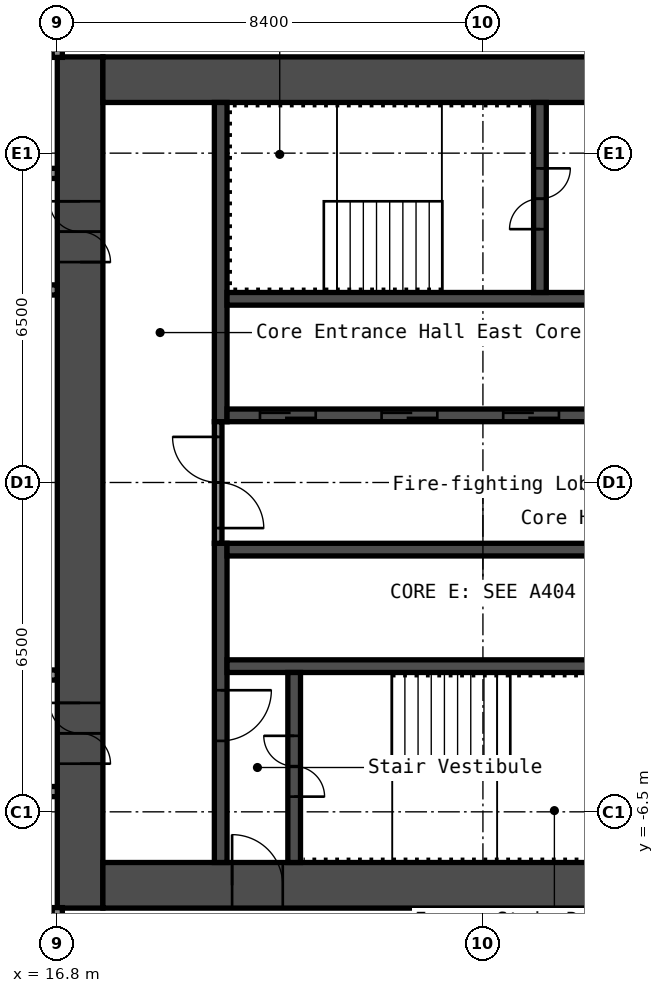
"""IFC4 building model, lengths in metres.
Left out: names, types, materials, properties, quantities, classifications, styles, units other than length and angle.
Written with IfcOpenShell. Run it as: python <this file> out.ifc"""

import sys

from ifc_helpers import new_model, si_unit, direction, frame, frame_2d, origin, place, context, subcontext, project, spatial, rectangle, extrude, element, fill, save


model = new_model("IFC4")
c1 = context("Model", 3, precision=1e-05, world=origin(), true_north=direction((0.0, 1.0)))
c2 = subcontext(c1, "Body", "Model", "MODEL_VIEW")
j1 = project(units=[si_unit("LENGTHUNIT", "METRE"), si_unit("PLANEANGLEUNIT", "RADIAN")], contexts=[c1])
p1 = place(None, origin())
s1 = spatial("IfcSite", under=j1, at=p1, CompositionType="ELEMENT")
p2 = place(p1, origin())
s2 = spatial("IfcBuilding", under=s1, at=p2, CompositionType="ELEMENT")
p3 = place(p2, frame((0.0, 0.0, 26.2)))
s3 = spatial("IfcBuildingStorey", under=s2, at=p3, CompositionType="ELEMENT", Elevation=26.2)
p4 = place(p3, frame((17.25, -8.4, 0.0), z_axis=(0.0, 0.0, 1.0), x_axis=(0.0, 1.0, 0.0)))
e1 = element("IfcWall", 1, at=p4, inside=s3, PredefinedType="SHEAR", context=c2, shape_type="SweptSolid", body=[
    extrude(rectangle(XDim=16.8, YDim=0.9, at=frame_2d((8.4, 0.0))), origin(), (0.0, 0.0, 1.0), 2.8),
])
p5 = place(p4, frame((12.75, 0.0, 0.0)))
e2 = element("IfcOpeningElement", 2, at=p5, cuts=e1, PredefinedType="OPENING", context=c2, shape_type="SweptSolid", body=[
    extrude(rectangle(XDim=1.2, YDim=2.1, at=frame_2d((0.6, 1.05))), frame((0.0, 0.46, 0.0), z_axis=(0.0, -1.0, 0.0), x_axis=(1.0, 0.0, 0.0)), (0.0, 0.0, 1.0), 0.92),
])
p6 = place(p4, frame((2.85, 0.0, 0.0)))
e3 = element("IfcOpeningElement", 3, at=p6, cuts=e1, PredefinedType="OPENING", context=c2, shape_type="SweptSolid", body=[
    extrude(rectangle(XDim=1.2, YDim=2.1, at=frame_2d((0.6, 1.05))), frame((0.0, 0.46, 0.0), z_axis=(0.0, -1.0, 0.0), x_axis=(1.0, 0.0, 0.0)), (0.0, 0.0, 1.0), 0.92),
])
p7 = place(p3, frame((17.7, 7.95, 0.0), z_axis=(0.0, 0.0, 1.0), x_axis=(1.0, 0.0, 0.0)))
e4 = element("IfcWall", 4, at=p7, inside=s3, PredefinedType="SHEAR", context=c2, shape_type="SweptSolid", body=[
    extrude(rectangle(XDim=15.0, YDim=0.9, at=frame_2d((7.5, 0.0))), origin(), (0.0, 0.0, 1.0), 2.8),
])
p8 = place(p7, frame((10.4, 0.0, 0.0)))
e5 = element("IfcOpeningElement", 5, at=p8, cuts=e4, PredefinedType="OPENING", context=c2, shape_type="SweptSolid", body=[
    extrude(rectangle(XDim=1.2, YDim=2.1, at=frame_2d((0.6, 1.05))), frame((0.0, 0.46, 0.0), z_axis=(0.0, -1.0, 0.0), x_axis=(1.0, 0.0, 0.0)), (0.0, 0.0, 1.0), 0.92),
])
p9 = place(p7, frame((13.35, 0.0, 0.0)))
e6 = element("IfcOpeningElement", 6, at=p9, cuts=e4, PredefinedType="OPENING", context=c2, shape_type="SweptSolid", body=[
    extrude(rectangle(XDim=0.9, YDim=2.1, at=frame_2d((0.45, 1.05))), frame((0.0, 0.46, 0.0), z_axis=(0.0, -1.0, 0.0), x_axis=(1.0, 0.0, 0.0)), (0.0, 0.0, 1.0), 0.92),
])
p10 = place(p3, frame((17.7, -7.95, 0.0), z_axis=(0.0, 0.0, 1.0), x_axis=(1.0, 0.0, 0.0)))
e7 = element("IfcWall", 7, at=p10, inside=s3, PredefinedType="SHEAR", context=c2, shape_type="SweptSolid", body=[
    extrude(rectangle(XDim=15.0, YDim=0.9, at=frame_2d((7.5, 0.0))), origin(), (0.0, 0.0, 1.0), 2.8),
])
p11 = place(p10, frame((2.55, 0.0, 0.0)))
e8 = element("IfcOpeningElement", 8, at=p11, cuts=e7, PredefinedType="OPENING", context=c2, shape_type="SweptSolid", body=[
    extrude(rectangle(XDim=1.0, YDim=2.1, at=frame_2d((0.5, 1.05))), frame((0.0, 0.46, 0.0), z_axis=(0.0, -1.0, 0.0), x_axis=(1.0, 0.0, 0.0)), (0.0, 0.0, 1.0), 0.92),
])
p12 = place(p3, frame((20.025, 1.2, 0.0), z_axis=(0.0, 0.0, 1.0), x_axis=(0.0, 1.0, 0.0)))
e9 = element("IfcWall", 9, at=p12, inside=s3, PredefinedType="SHEAR", context=c2, shape_type="SweptSolid", body=[
    extrude(rectangle(XDim=6.3, YDim=0.25, at=frame_2d((3.15, 0.0))), origin(), (0.0, 0.0, 1.0), 2.8),
])
p13 = place(p3, frame((20.025, -7.5, 0.0), z_axis=(0.0, 0.0, 1.0), x_axis=(0.0, 1.0, 0.0)))
e10 = element("IfcWall", 10, at=p13, inside=s3, PredefinedType="SHEAR", context=c2, shape_type="SweptSolid", body=[
    extrude(rectangle(XDim=6.3, YDim=0.25, at=frame_2d((3.15, 0.0))), origin(), (0.0, 0.0, 1.0), 2.8),
])
p14 = place(p13, frame((2.4, 0.0, 0.0)))
e11 = element("IfcOpeningElement", 11, at=p14, cuts=e10, PredefinedType="OPENING", context=c2, shape_type="SweptSolid", body=[
    extrude(rectangle(XDim=1.0, YDim=2.1, at=frame_2d((0.5, 1.05))), frame((0.0, 0.135, 0.0), z_axis=(0.0, -1.0, 0.0), x_axis=(1.0, 0.0, 0.0)), (0.0, 0.0, 1.0), 0.27),
])
p15 = place(p3, frame((20.15, 1.325, 0.0), z_axis=(0.0, 0.0, 1.0), x_axis=(1.0, 0.0, 0.0)))
e12 = element("IfcWall", 12, at=p15, inside=s3, PredefinedType="SHEAR", context=c2, shape_type="SweptSolid", body=[
    extrude(rectangle(XDim=7.5, YDim=0.25, at=frame_2d((3.75, 0.0))), origin(), (0.0, 0.0, 1.0), 2.8),
])
p16 = place(p15, frame((0.65, 0.0, 0.0)))
e13 = element("IfcOpeningElement", 13, at=p16, cuts=e12, PredefinedType="OPENING", context=c2, shape_type="SweptSolid", body=[
    extrude(rectangle(XDim=1.1, YDim=2.1, at=frame_2d((0.55, 1.05))), frame((0.0, 0.135, 0.0), z_axis=(0.0, -1.0, 0.0), x_axis=(1.0, 0.0, 0.0)), (0.0, 0.0, 1.0), 0.27),
])
p17 = place(p15, frame((3.05, 0.0, 0.0)))
e14 = element("IfcOpeningElement", 14, at=p17, cuts=e12, PredefinedType="OPENING", context=c2, shape_type="SweptSolid", body=[
    extrude(rectangle(XDim=1.1, YDim=2.1, at=frame_2d((0.55, 1.05))), frame((0.0, 0.135, 0.0), z_axis=(0.0, -1.0, 0.0), x_axis=(1.0, 0.0, 0.0)), (0.0, 0.0, 1.0), 0.27),
])
p18 = place(p15, frame((5.45, 0.0, 0.0)))
e15 = element("IfcOpeningElement", 15, at=p18, cuts=e12, PredefinedType="OPENING", context=c2, shape_type="SweptSolid", body=[
    extrude(rectangle(XDim=1.1, YDim=2.1, at=frame_2d((0.55, 1.05))), frame((0.0, 0.135, 0.0), z_axis=(0.0, -1.0, 0.0), x_axis=(1.0, 0.0, 0.0)), (0.0, 0.0, 1.0), 0.27),
])
p19 = place(p3, frame((20.15, 3.625, 0.0), z_axis=(0.0, 0.0, 1.0), x_axis=(1.0, 0.0, 0.0)))
e16 = element("IfcWall", 16, at=p19, inside=s3, PredefinedType="SHEAR", context=c2, shape_type="SweptSolid", body=[
    extrude(rectangle(XDim=7.5, YDim=0.25, at=frame_2d((3.75, 0.0))), origin(), (0.0, 0.0, 1.0), 2.8),
])
p20 = place(p3, frame((26.325, 3.75, 0.0), z_axis=(0.0, 0.0, 1.0), x_axis=(0.0, 1.0, 0.0)))
e17 = element("IfcWall", 17, at=p20, inside=s3, PredefinedType="SHEAR", context=c2, shape_type="SweptSolid", body=[
    extrude(rectangle(XDim=3.75, YDim=0.25, at=frame_2d((1.875, 0.0))), origin(), (0.0, 0.0, 1.0), 2.8),
])
p21 = place(p20, frame((1.25, 0.0, 0.0)))
e18 = element("IfcOpeningElement", 18, at=p21, cuts=e17, PredefinedType="OPENING", context=c2, shape_type="SweptSolid", body=[
    extrude(rectangle(XDim=1.2, YDim=2.1, at=frame_2d((0.6, 1.05))), frame((0.0, 0.135, 0.0), z_axis=(0.0, -1.0, 0.0), x_axis=(1.0, 0.0, 0.0)), (0.0, 0.0, 1.0), 0.27),
])
for number, where, z_axis, x_axis in (
    (19, (20.15, -1.325, 0.0), (0.0, 0.0, 1.0), (1.0, 0.0, 0.0)),
    (20, (20.15, -3.625, 0.0), (0.0, 0.0, 1.0), (1.0, 0.0, 0.0)),
):
    element("IfcWall", number, at=place(p3, frame(where, z_axis=z_axis, x_axis=x_axis)), inside=s3, PredefinedType="SHEAR", context=c2, shape_type="SweptSolid", body=[
        extrude(rectangle(XDim=7.5, YDim=0.25, at=frame_2d((3.75, 0.0))), origin(), (0.0, 0.0, 1.0), 2.8),
    ])
p22 = place(p3, frame((21.475, -7.5, 0.0), z_axis=(0.0, 0.0, 1.0), x_axis=(0.0, 1.0, 0.0)))
e21 = element("IfcWall", 21, at=p22, inside=s3, PredefinedType="SHEAR", context=c2, shape_type="SweptSolid", body=[
    extrude(rectangle(XDim=3.75, YDim=0.25, at=frame_2d((1.875, 0.0))), origin(), (0.0, 0.0, 1.0), 2.8),
])
p23 = place(p22, frame((1.3, 0.0, 0.0)))
e22 = element("IfcOpeningElement", 22, at=p23, cuts=e21, PredefinedType="OPENING", context=c2, shape_type="SweptSolid", body=[
    extrude(rectangle(XDim=1.2, YDim=2.1, at=frame_2d((0.6, 1.05))), frame((0.0, 0.135, 0.0), z_axis=(0.0, -1.0, 0.0), x_axis=(1.0, 0.0, 0.0)), (0.0, 0.0, 1.0), 0.27),
])
p24 = place(p3, frame((19.975, -1.2, 0.0), z_axis=(0.0, 0.0, 1.0), x_axis=(0.0, 1.0, 0.0)))
e23 = element("IfcWall", 23, at=p24, inside=s3, PredefinedType="PARTITIONING", context=c2, shape_type="SweptSolid", body=[
    extrude(rectangle(XDim=2.4, YDim=0.15, at=frame_2d((1.2, 0.0))), origin(), (0.0, 0.0, 1.0), 2.8),
])
p25 = place(p24, frame((0.3, 0.0, 0.0)))
e24 = element("IfcOpeningElement", 24, at=p25, cuts=e23, PredefinedType="OPENING", context=c2, shape_type="SweptSolid", body=[
    extrude(rectangle(XDim=1.8, YDim=2.1, at=frame_2d((0.9, 1.05))), frame((0.0, 0.085, 0.0), z_axis=(0.0, -1.0, 0.0), x_axis=(1.0, 0.0, 0.0)), (0.0, 0.0, 1.0), 0.17),
])
p26 = place(p3, frame((-16.8, -6.1, 0.0), z_axis=(0.0, 0.0, 1.0), x_axis=(1.0, 0.0, 0.0)))
e25 = element("IfcWall", 25, at=p26, inside=s3, PredefinedType="PARTITIONING", context=c2, shape_type="SweptSolid", body=[
    extrude(rectangle(XDim=33.6, YDim=0.2, at=frame_2d((16.8, 0.0))), origin(), (0.0, 0.0, 1.0), 2.8),
])
p27 = place(p26, frame((2.0, 0.0, 0.0)))
e26 = element("IfcOpeningElement", 26, at=p27, cuts=e25, PredefinedType="OPENING", context=c2, shape_type="SweptSolid", body=[
    extrude(rectangle(XDim=1.0, YDim=2.1, at=frame_2d((0.5, 1.05))), frame((0.0, 0.11, 0.0), z_axis=(0.0, -1.0, 0.0), x_axis=(1.0, 0.0, 0.0)), (0.0, 0.0, 1.0), 0.22),
])
p28 = place(p26, frame((11.25, 0.0, 0.0)))
e27 = element("IfcOpeningElement", 27, at=p28, cuts=e25, PredefinedType="OPENING", context=c2, shape_type="SweptSolid", body=[
    extrude(rectangle(XDim=1.0, YDim=2.1, at=frame_2d((0.5, 1.05))), frame((0.0, 0.11, 0.0), z_axis=(0.0, -1.0, 0.0), x_axis=(1.0, 0.0, 0.0)), (0.0, 0.0, 1.0), 0.22),
])
p29 = place(p26, frame((12.95, 0.0, 0.0)))
e28 = element("IfcOpeningElement", 28, at=p29, cuts=e25, PredefinedType="OPENING", context=c2, shape_type="SweptSolid", body=[
    extrude(rectangle(XDim=1.0, YDim=2.1, at=frame_2d((0.5, 1.05))), frame((0.0, 0.11, 0.0), z_axis=(0.0, -1.0, 0.0), x_axis=(1.0, 0.0, 0.0)), (0.0, 0.0, 1.0), 0.22),
])
p30 = place(p26, frame((18.28, 0.0, 0.0)))
e29 = element("IfcOpeningElement", 29, at=p30, cuts=e25, PredefinedType="OPENING", context=c2, shape_type="SweptSolid", body=[
    extrude(rectangle(XDim=0.9, YDim=2.1, at=frame_2d((0.45, 1.05))), frame((0.0, 0.11, 0.0), z_axis=(0.0, -1.0, 0.0), x_axis=(1.0, 0.0, 0.0)), (0.0, 0.0, 1.0), 0.22),
])
p31 = place(p26, frame((22.48, 0.0, 0.0)))
e30 = element("IfcOpeningElement", 30, at=p31, cuts=e25, PredefinedType="OPENING", context=c2, shape_type="SweptSolid", body=[
    extrude(rectangle(XDim=0.9, YDim=2.1, at=frame_2d((0.45, 1.05))), frame((0.0, 0.11, 0.0), z_axis=(0.0, -1.0, 0.0), x_axis=(1.0, 0.0, 0.0)), (0.0, 0.0, 1.0), 0.22),
])
p32 = place(p26, frame((28.05, 0.0, 0.0)))
e31 = element("IfcOpeningElement", 31, at=p32, cuts=e25, PredefinedType="OPENING", context=c2, shape_type="SweptSolid", body=[
    extrude(rectangle(XDim=1.0, YDim=2.1, at=frame_2d((0.5, 1.05))), frame((0.0, 0.11, 0.0), z_axis=(0.0, -1.0, 0.0), x_axis=(1.0, 0.0, 0.0)), (0.0, 0.0, 1.0), 0.22),
])
p33 = place(p26, frame((29.75, 0.0, 0.0)))
e32 = element("IfcOpeningElement", 32, at=p33, cuts=e25, PredefinedType="OPENING", context=c2, shape_type="SweptSolid", body=[
    extrude(rectangle(XDim=1.0, YDim=2.1, at=frame_2d((0.5, 1.05))), frame((0.0, 0.11, 0.0), z_axis=(0.0, -1.0, 0.0), x_axis=(1.0, 0.0, 0.0)), (0.0, 0.0, 1.0), 0.22),
])
p34 = place(p3, frame((-16.8, -3.8, 0.0), z_axis=(0.0, 0.0, 1.0), x_axis=(1.0, 0.0, 0.0)))
e33 = element("IfcWall", 33, at=p34, inside=s3, PredefinedType="PARTITIONING", context=c2, shape_type="SweptSolid", body=[
    extrude(rectangle(XDim=33.6, YDim=0.2, at=frame_2d((16.8, 0.0))), origin(), (0.0, 0.0, 1.0), 2.8),
])
p35 = place(p34, frame((9.715, 0.0, 0.0)))
e34 = element("IfcOpeningElement", 34, at=p35, cuts=e33, PredefinedType="OPENING", context=c2, shape_type="SweptSolid", body=[
    extrude(rectangle(XDim=0.9, YDim=2.1, at=frame_2d((0.45, 1.05))), frame((0.0, 0.11, 0.0), z_axis=(0.0, -1.0, 0.0), x_axis=(1.0, 0.0, 0.0)), (0.0, 0.0, 1.0), 0.22),
])
p36 = place(p34, frame((13.915, 0.0, 0.0)))
e35 = element("IfcOpeningElement", 35, at=p36, cuts=e33, PredefinedType="OPENING", context=c2, shape_type="SweptSolid", body=[
    extrude(rectangle(XDim=0.9, YDim=2.1, at=frame_2d((0.45, 1.05))), frame((0.0, 0.11, 0.0), z_axis=(0.0, -1.0, 0.0), x_axis=(1.0, 0.0, 0.0)), (0.0, 0.0, 1.0), 0.22),
])
p37 = place(p34, frame((26.345, 0.0, 0.0)))
e36 = element("IfcOpeningElement", 36, at=p37, cuts=e33, PredefinedType="OPENING", context=c2, shape_type="SweptSolid", body=[
    extrude(rectangle(XDim=0.9, YDim=2.1, at=frame_2d((0.45, 1.05))), frame((0.0, 0.11, 0.0), z_axis=(0.0, -1.0, 0.0), x_axis=(1.0, 0.0, 0.0)), (0.0, 0.0, 1.0), 0.22),
])
p38 = place(p34, frame((30.545, 0.0, 0.0)))
e37 = element("IfcOpeningElement", 37, at=p38, cuts=e33, PredefinedType="OPENING", context=c2, shape_type="SweptSolid", body=[
    extrude(rectangle(XDim=0.9, YDim=2.1, at=frame_2d((0.45, 1.05))), frame((0.0, 0.11, 0.0), z_axis=(0.0, -1.0, 0.0), x_axis=(1.0, 0.0, 0.0)), (0.0, 0.0, 1.0), 0.22),
])
p39 = place(p3, frame((-16.8, 3.8, 0.0), z_axis=(0.0, 0.0, 1.0), x_axis=(1.0, 0.0, 0.0)))
e38 = element("IfcWall", 38, at=p39, inside=s3, PredefinedType="PARTITIONING", context=c2, shape_type="SweptSolid", body=[
    extrude(rectangle(XDim=33.6, YDim=0.2, at=frame_2d((16.8, 0.0))), origin(), (0.0, 0.0, 1.0), 2.8),
])
p40 = place(p39, frame((1.985, 0.0, 0.0)))
e39 = element("IfcOpeningElement", 39, at=p40, cuts=e38, PredefinedType="OPENING", context=c2, shape_type="SweptSolid", body=[
    extrude(rectangle(XDim=0.9, YDim=2.1, at=frame_2d((0.45, 1.05))), frame((0.0, 0.11, 0.0), z_axis=(0.0, -1.0, 0.0), x_axis=(1.0, 0.0, 0.0)), (0.0, 0.0, 1.0), 0.22),
])
p41 = place(p39, frame((6.185, 0.0, 0.0)))
e40 = element("IfcOpeningElement", 40, at=p41, cuts=e38, PredefinedType="OPENING", context=c2, shape_type="SweptSolid", body=[
    extrude(rectangle(XDim=0.9, YDim=2.1, at=frame_2d((0.45, 1.05))), frame((0.0, 0.11, 0.0), z_axis=(0.0, -1.0, 0.0), x_axis=(1.0, 0.0, 0.0)), (0.0, 0.0, 1.0), 0.22),
])
p42 = place(p39, frame((18.2, 0.0, 0.0)))
e41 = element("IfcOpeningElement", 41, at=p42, cuts=e38, PredefinedType="OPENING", context=c2, shape_type="SweptSolid", body=[
    extrude(rectangle(XDim=0.9, YDim=2.1, at=frame_2d((0.45, 1.05))), frame((0.0, 0.11, 0.0), z_axis=(0.0, -1.0, 0.0), x_axis=(1.0, 0.0, 0.0)), (0.0, 0.0, 1.0), 0.22),
])
p43 = place(p39, frame((22.4, 0.0, 0.0)))
e42 = element("IfcOpeningElement", 42, at=p43, cuts=e38, PredefinedType="OPENING", context=c2, shape_type="SweptSolid", body=[
    extrude(rectangle(XDim=0.9, YDim=2.1, at=frame_2d((0.45, 1.05))), frame((0.0, 0.11, 0.0), z_axis=(0.0, -1.0, 0.0), x_axis=(1.0, 0.0, 0.0)), (0.0, 0.0, 1.0), 0.22),
])
p44 = place(p3, frame((-16.8, 6.1, 0.0), z_axis=(0.0, 0.0, 1.0), x_axis=(1.0, 0.0, 0.0)))
e43 = element("IfcWall", 43, at=p44, inside=s3, PredefinedType="PARTITIONING", context=c2, shape_type="SweptSolid", body=[
    extrude(rectangle(XDim=33.6, YDim=0.2, at=frame_2d((16.8, 0.0))), origin(), (0.0, 0.0, 1.0), 2.8),
])
p45 = place(p44, frame((2.0, 0.0, 0.0)))
e44 = element("IfcOpeningElement", 44, at=p45, cuts=e43, PredefinedType="OPENING", context=c2, shape_type="SweptSolid", body=[
    extrude(rectangle(XDim=1.0, YDim=2.1, at=frame_2d((0.5, 1.05))), frame((0.0, 0.11, 0.0), z_axis=(0.0, -1.0, 0.0), x_axis=(1.0, 0.0, 0.0)), (0.0, 0.0, 1.0), 0.22),
])
p46 = place(p44, frame((11.25, 0.0, 0.0)))
e45 = element("IfcOpeningElement", 45, at=p46, cuts=e43, PredefinedType="OPENING", context=c2, shape_type="SweptSolid", body=[
    extrude(rectangle(XDim=1.0, YDim=2.1, at=frame_2d((0.5, 1.05))), frame((0.0, 0.11, 0.0), z_axis=(0.0, -1.0, 0.0), x_axis=(1.0, 0.0, 0.0)), (0.0, 0.0, 1.0), 0.22),
])
p47 = place(p44, frame((12.95, 0.0, 0.0)))
e46 = element("IfcOpeningElement", 46, at=p47, cuts=e43, PredefinedType="OPENING", context=c2, shape_type="SweptSolid", body=[
    extrude(rectangle(XDim=1.0, YDim=2.1, at=frame_2d((0.5, 1.05))), frame((0.0, 0.11, 0.0), z_axis=(0.0, -1.0, 0.0), x_axis=(1.0, 0.0, 0.0)), (0.0, 0.0, 1.0), 0.22),
])
p48 = place(p44, frame((18.7, 0.0, 0.0)))
e47 = element("IfcOpeningElement", 47, at=p48, cuts=e43, PredefinedType="OPENING", context=c2, shape_type="SweptSolid", body=[
    extrude(rectangle(XDim=0.9, YDim=2.1, at=frame_2d((0.45, 1.05))), frame((0.0, 0.11, 0.0), z_axis=(0.0, -1.0, 0.0), x_axis=(1.0, 0.0, 0.0)), (0.0, 0.0, 1.0), 0.22),
])
p49 = place(p44, frame((22.9, 0.0, 0.0)))
e48 = element("IfcOpeningElement", 48, at=p49, cuts=e43, PredefinedType="OPENING", context=c2, shape_type="SweptSolid", body=[
    extrude(rectangle(XDim=0.9, YDim=2.1, at=frame_2d((0.45, 1.05))), frame((0.0, 0.11, 0.0), z_axis=(0.0, -1.0, 0.0), x_axis=(1.0, 0.0, 0.0)), (0.0, 0.0, 1.0), 0.22),
])
p50 = place(p44, frame((28.05, 0.0, 0.0)))
e49 = element("IfcOpeningElement", 49, at=p50, cuts=e43, PredefinedType="OPENING", context=c2, shape_type="SweptSolid", body=[
    extrude(rectangle(XDim=1.0, YDim=2.1, at=frame_2d((0.5, 1.05))), frame((0.0, 0.11, 0.0), z_axis=(0.0, -1.0, 0.0), x_axis=(1.0, 0.0, 0.0)), (0.0, 0.0, 1.0), 0.22),
])
p51 = place(p44, frame((29.75, 0.0, 0.0)))
e50 = element("IfcOpeningElement", 50, at=p51, cuts=e43, PredefinedType="OPENING", context=c2, shape_type="SweptSolid", body=[
    extrude(rectangle(XDim=1.0, YDim=2.1, at=frame_2d((0.5, 1.05))), frame((0.0, 0.11, 0.0), z_axis=(0.0, -1.0, 0.0), x_axis=(1.0, 0.0, 0.0)), (0.0, 0.0, 1.0), 0.22),
])
for number, where, z_axis, x_axis in (
    (51, (16.8, -20.3, 0.0), (0.0, 0.0, 1.0), (0.0, 1.0, 0.0)),
    (52, (16.8, 8.39, 0.0), (0.0, 0.0, 1.0), (0.0, 1.0, 0.0)),
):
    element("IfcWall", number, at=place(p3, frame(where, z_axis=z_axis, x_axis=x_axis)), inside=s3, PredefinedType="PARTITIONING", context=c2, shape_type="SweptSolid", body=[
        extrude(rectangle(XDim=11.91, YDim=0.2, at=frame_2d((5.955, 0.0))), origin(), (0.0, 0.0, 1.0), 2.8),
    ])
p52 = place(p5, origin())
e53 = element("IfcDoor", 53, at=p52, inside=s3, OperationType="DOUBLE_DOOR_SINGLE_SWING", PredefinedType="DOOR", context=c2, shape_type="SweptSolid", body=[
    extrude(rectangle(XDim=1.2, YDim=2.1, at=frame_2d((0.6, 1.05))), frame((0.0, 0.025, 0.0), z_axis=(0.0, -1.0, 0.0), x_axis=(1.0, 0.0, 0.0)), (0.0, 0.0, 1.0), 0.05),
])
fill(e2, e53)
p53 = place(p6, origin())
e54 = element("IfcDoor", 54, at=p53, inside=s3, OperationType="DOUBLE_DOOR_SINGLE_SWING", PredefinedType="DOOR", context=c2, shape_type="SweptSolid", body=[
    extrude(rectangle(XDim=1.2, YDim=2.1, at=frame_2d((0.6, 1.05))), frame((0.0, 0.025, 0.0), z_axis=(0.0, -1.0, 0.0), x_axis=(1.0, 0.0, 0.0)), (0.0, 0.0, 1.0), 0.05),
])
fill(e3, e54)
p54 = place(p11, origin())
e55 = element("IfcDoor", 55, at=p54, inside=s3, OperationType="SINGLE_SWING_RIGHT", PredefinedType="DOOR", context=c2, shape_type="SweptSolid", body=[
    extrude(rectangle(XDim=1.0, YDim=2.1, at=frame_2d((0.5, 1.05))), frame((0.0, 0.025, 0.0), z_axis=(0.0, -1.0, 0.0), x_axis=(1.0, 0.0, 0.0)), (0.0, 0.0, 1.0), 0.05),
])
fill(e8, e55)
p55 = place(p21, origin())
e56 = element("IfcDoor", 56, at=p55, inside=s3, OperationType="DOUBLE_DOOR_SINGLE_SWING", PredefinedType="DOOR", context=c2, shape_type="SweptSolid", body=[
    extrude(rectangle(XDim=1.2, YDim=2.1, at=frame_2d((0.6, 1.05))), frame((0.0, 0.025, 0.0), z_axis=(0.0, -1.0, 0.0), x_axis=(1.0, 0.0, 0.0)), (0.0, 0.0, 1.0), 0.05),
])
fill(e18, e56)
p56 = place(p23, origin())
e57 = element("IfcDoor", 57, at=p56, inside=s3, OperationType="DOUBLE_DOOR_SINGLE_SWING", PredefinedType="DOOR", context=c2, shape_type="SweptSolid", body=[
    extrude(rectangle(XDim=1.2, YDim=2.1, at=frame_2d((0.6, 1.05))), frame((0.0, 0.025, 0.0), z_axis=(0.0, -1.0, 0.0), x_axis=(1.0, 0.0, 0.0)), (0.0, 0.0, 1.0), 0.05),
])
fill(e22, e57)
p57 = place(p14, origin())
e58 = element("IfcDoor", 58, at=p57, inside=s3, OperationType="SINGLE_SWING_RIGHT", PredefinedType="DOOR", context=c2, shape_type="SweptSolid", body=[
    extrude(rectangle(XDim=1.0, YDim=2.1, at=frame_2d((0.5, 1.05))), frame((0.0, 0.025, 0.0), z_axis=(0.0, -1.0, 0.0), x_axis=(1.0, 0.0, 0.0)), (0.0, 0.0, 1.0), 0.05),
])
fill(e11, e58)
p58 = place(p25, origin())
e59 = element("IfcDoor", 59, at=p58, inside=s3, OperationType="DOUBLE_DOOR_SINGLE_SWING", PredefinedType="DOOR", context=c2, shape_type="SweptSolid", body=[
    extrude(rectangle(XDim=1.8, YDim=2.1, at=frame_2d((0.9, 1.05))), frame((0.0, 0.025, 0.0), z_axis=(0.0, -1.0, 0.0), x_axis=(1.0, 0.0, 0.0)), (0.0, 0.0, 1.0), 0.05),
])
fill(e24, e59)
p59 = place(p16, origin())
e60 = element("IfcDoor", 60, at=p59, inside=s3, OperationType="DOUBLE_DOOR_SLIDING", PredefinedType="DOOR", context=c2, shape_type="SweptSolid", body=[
    extrude(rectangle(XDim=1.1, YDim=2.1, at=frame_2d((0.55, 1.05))), frame((0.0, 0.025, 0.0), z_axis=(0.0, -1.0, 0.0), x_axis=(1.0, 0.0, 0.0)), (0.0, 0.0, 1.0), 0.05),
])
fill(e13, e60)
p60 = place(p17, origin())
e61 = element("IfcDoor", 61, at=p60, inside=s3, OperationType="DOUBLE_DOOR_SLIDING", PredefinedType="DOOR", context=c2, shape_type="SweptSolid", body=[
    extrude(rectangle(XDim=1.1, YDim=2.1, at=frame_2d((0.55, 1.05))), frame((0.0, 0.025, 0.0), z_axis=(0.0, -1.0, 0.0), x_axis=(1.0, 0.0, 0.0)), (0.0, 0.0, 1.0), 0.05),
])
fill(e14, e61)
p61 = place(p18, origin())
e62 = element("IfcDoor", 62, at=p61, inside=s3, OperationType="DOUBLE_DOOR_SLIDING", PredefinedType="DOOR", context=c2, shape_type="SweptSolid", body=[
    extrude(rectangle(XDim=1.1, YDim=2.1, at=frame_2d((0.55, 1.05))), frame((0.0, 0.025, 0.0), z_axis=(0.0, -1.0, 0.0), x_axis=(1.0, 0.0, 0.0)), (0.0, 0.0, 1.0), 0.05),
])
fill(e15, e62)
save(model, sys.argv[1])
